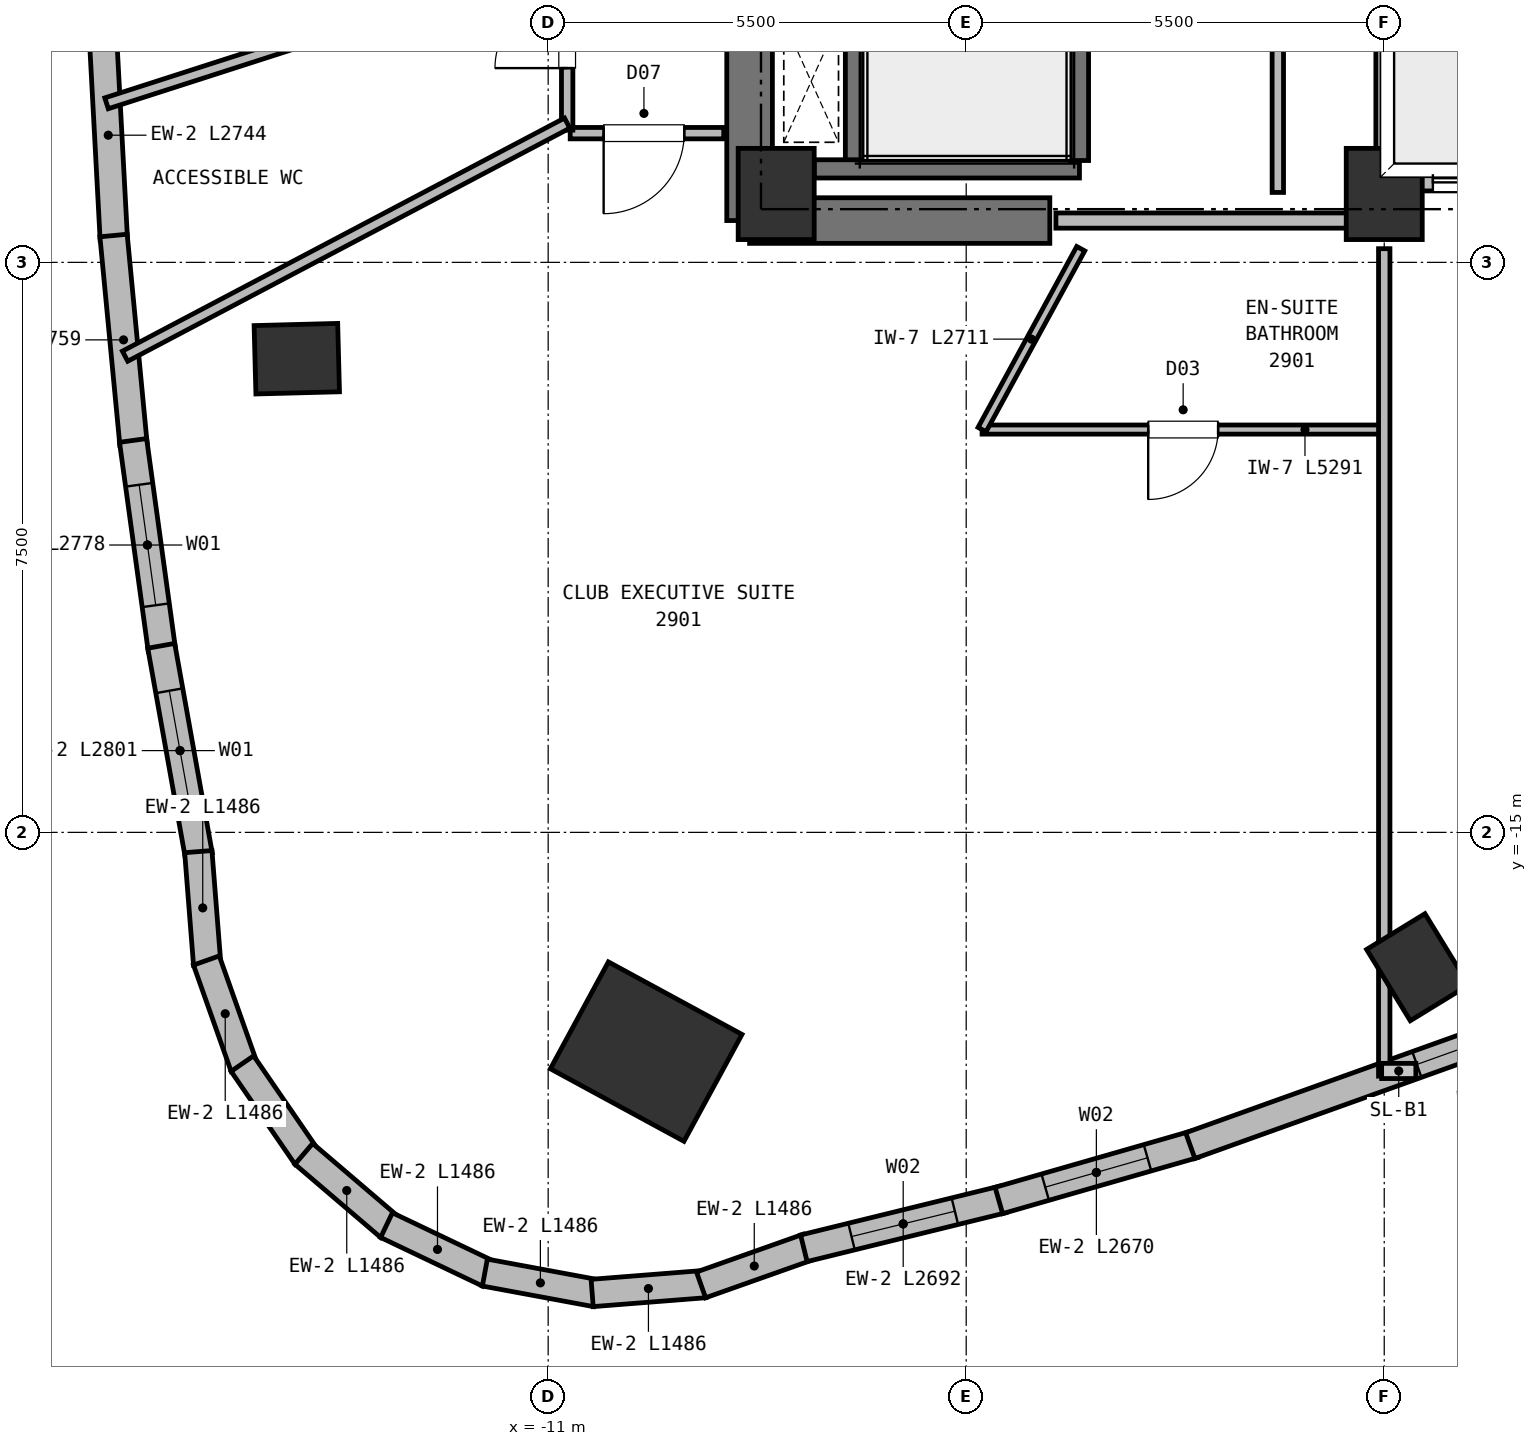
"""IFC4 building model, lengths in metres.
Left out: names, types, materials, properties, quantities, classifications, styles, units other than length and angle.
Written with IfcOpenShell. Run it as: python <this file> out.ifc"""

import sys

from ifc_helpers import new_model, si_unit, direction, frame, frame_2d, origin, origin_2d, place, context, subcontext, project, spatial, rectangle, extrude, element, fill, save


model = new_model("IFC4")
c1 = context("Model", 3, precision=1e-05, world=origin(), true_north=direction((0.0, 1.0)))
c2 = subcontext(c1, "Body", "Model", "MODEL_VIEW")
j1 = project(units=[si_unit("LENGTHUNIT", "METRE"), si_unit("PLANEANGLEUNIT", "RADIAN")], contexts=[c1])
p1 = place(None, origin())
s1 = spatial("IfcSite", under=j1, at=p1, CompositionType="ELEMENT")
p2 = place(p1, origin())
s2 = spatial("IfcBuilding", under=s1, at=p2, CompositionType="ELEMENT")
p3 = place(p2, frame((0.0, 0.0, 108.5)))
s3 = spatial("IfcBuildingStorey", under=s2, at=p3, CompositionType="ELEMENT", Elevation=108.5)
for number, where, z_axis, x_axis in (
    (1, (-8.0, -6.6, 0.0), (0.0, 0.0, 1.0), (1.0, 0.0, 0.0)),
    (2, (0.0, -6.6, 0.0), (0.0, 0.0, 1.0), (1.0, 0.0, 0.0)),
):
    element("IfcColumn", number, at=place(p3, frame(where, z_axis=z_axis, x_axis=x_axis)), inside=s3, PredefinedType="COLUMN", context=c2, shape_type="SweptSolid", body=[
        extrude(rectangle(XDim=1.0, YDim=1.2, at=origin_2d()), origin(), (0.0, 0.0, 1.0), 3.75),
    ])
p4 = place(p3, frame((-8.35, -6.95, 0.0), z_axis=(0.0, 0.0, 1.0), x_axis=(1.0, 0.0, 0.0)))
e3 = element("IfcWall", 3, at=p4, inside=s3, PredefinedType="SHEAR", context=c2, shape_type="SweptSolid", body=[
    extrude(rectangle(XDim=3.95, YDim=0.6, at=frame_2d((1.975, 0.0))), origin(), (0.0, 0.0, 1.0), 3.5),
])
p5 = place(p3, frame((-8.35, -6.95, 0.0), z_axis=(0.0, 0.0, 1.0), x_axis=(0.0, 1.0, 0.0)))
e4 = element("IfcWall", 4, at=p5, inside=s3, PredefinedType="SHEAR", context=c2, shape_type="SweptSolid", body=[
    extrude(rectangle(XDim=8.1, YDim=0.6, at=frame_2d((4.05, 0.0))), origin(), (0.0, 0.0, 1.0), 3.5),
])
p6 = place(p3, frame((-14.307, -8.768, 0.0), z_axis=(0.0, 0.0, 1.0), x_axis=(-0.026176948308, 0.999657324976, 0.0)))
e5 = element("IfcColumn", 5, at=p6, inside=s3, PredefinedType="COLUMN", context=c2, shape_type="SweptSolid", body=[
    extrude(rectangle(XDim=0.9, YDim=1.1, at=origin_2d()), origin(), (0.0, 0.0, 1.0), 3.75),
])
p7 = place(p3, frame((-9.71, -17.885, 0.0), z_axis=(0.0, 0.0, 1.0), x_axis=(0.47715876026, 0.878817112662, 0.0)))
e6 = element("IfcColumn", 6, at=p7, inside=s3, PredefinedType="COLUMN", context=c2, shape_type="SweptSolid", body=[
    extrude(rectangle(XDim=1.6, YDim=2.0, at=origin_2d()), origin(), (0.0, 0.0, 1.0), 3.75),
])
p8 = place(p3, frame((0.439, -16.774, 0.0), z_axis=(0.0, 0.0, 1.0), x_axis=(0.852640164354, 0.522498564716, 0.0)))
e7 = element("IfcColumn", 7, at=p8, inside=s3, PredefinedType="COLUMN", context=c2, shape_type="SweptSolid", body=[
    extrude(rectangle(XDim=0.9, YDim=1.1, at=origin_2d()), origin(), (0.0, 0.0, 1.0), 3.75),
])
p9 = place(p3, frame((-16.715, -7.197, 0.0), z_axis=(0.0, 0.0, 1.0), x_axis=(-0.053474125499, 0.998569235407, 0.0)))
e8 = element("IfcWall", 8, at=p9, inside=s3, PredefinedType="SOLIDWALL", context=c2, shape_type="SweptSolid", body=[
    extrude(rectangle(XDim=2.744, YDim=0.36, at=frame_2d((1.372, 0.0))), origin(), (0.0, 0.0, 1.0), 3.5),
])
p10 = place(p3, frame((-16.456, -9.893, 0.0), z_axis=(0.0, 0.0, 1.0), x_axis=(-0.095147411159, 0.99546319377, 0.0)))
e9 = element("IfcWall", 9, at=p10, inside=s3, PredefinedType="SOLIDWALL", context=c2, shape_type="SweptSolid", body=[
    extrude(rectangle(XDim=2.758, YDim=0.36, at=frame_2d((1.379, 0.0))), origin(), (0.0, 0.0, 1.0), 3.5),
])
p11 = place(p3, frame((-16.083, -12.595, 0.0), z_axis=(0.0, 0.0, 1.0), x_axis=(-0.136238828404, 0.99067602254, 0.0)))
e10 = element("IfcWall", 10, at=p11, inside=s3, PredefinedType="SOLIDWALL", context=c2, shape_type="SweptSolid", body=[
    extrude(rectangle(XDim=2.778, YDim=0.36, at=frame_2d((1.389, 0.0))), origin(), (0.0, 0.0, 1.0), 3.5),
])
p12 = place(p11, frame((0.589, 0.0, 0.72)))
e11 = element("IfcOpeningElement", 11, at=p12, cuts=e10, PredefinedType="OPENING", context=c2, shape_type="SweptSolid", body=[
    extrude(rectangle(XDim=1.6, YDim=1.88, at=frame_2d((0.8, 0.94))), frame((0.0, 0.19, 0.0), z_axis=(0.0, -1.0, 0.0), x_axis=(1.0, 0.0, 0.0)), (0.0, 0.0, 1.0), 0.38),
])
p13 = place(p3, frame((-15.597, -15.303, 0.0), z_axis=(0.0, 0.0, 1.0), x_axis=(-0.176399929502, 0.984318578953, 0.0)))
e12 = element("IfcWall", 12, at=p13, inside=s3, PredefinedType="SOLIDWALL", context=c2, shape_type="SweptSolid", body=[
    extrude(rectangle(XDim=2.801, YDim=0.36, at=frame_2d((1.401, 0.0))), origin(), (0.0, 0.0, 1.0), 3.5),
])
p14 = place(p13, frame((0.601, 0.0, 0.72)))
e13 = element("IfcOpeningElement", 13, at=p14, cuts=e12, PredefinedType="OPENING", context=c2, shape_type="SweptSolid", body=[
    extrude(rectangle(XDim=1.6, YDim=1.88, at=frame_2d((0.8, 0.94))), frame((0.0, 0.19, 0.0), z_axis=(0.0, -1.0, 0.0), x_axis=(1.0, 0.0, 0.0)), (0.0, 0.0, 1.0), 0.38),
])
p15 = place(p3, frame((-15.487, -16.734, 0.0), z_axis=(0.0, 0.0, 1.0), x_axis=(-0.078393018091, 0.996922531952, 0.0)))
e14 = element("IfcWall", 14, at=p15, inside=s3, PredefinedType="SOLIDWALL", context=c2, shape_type="SweptSolid", body=[
    extrude(rectangle(XDim=1.486, YDim=0.36, at=frame_2d((0.743, 0.0))), origin(), (0.0, 0.0, 1.0), 3.5),
])
p16 = place(p3, frame((-15.001, -18.087, 0.0), z_axis=(0.0, 0.0, 1.0), x_axis=(-0.333670746008, 0.942689680254, 0.0)))
e15 = element("IfcWall", 15, at=p16, inside=s3, PredefinedType="SOLIDWALL", context=c2, shape_type="SweptSolid", body=[
    extrude(rectangle(XDim=1.486, YDim=0.36, at=frame_2d((0.743, 0.0))), origin(), (0.0, 0.0, 1.0), 3.5),
])
p17 = place(p3, frame((-14.182, -19.267, 0.0), z_axis=(0.0, 0.0, 1.0), x_axis=(-0.566438155808, 0.824104250472, 0.0)))
e16 = element("IfcWall", 16, at=p17, inside=s3, PredefinedType="SOLIDWALL", context=c2, shape_type="SweptSolid", body=[
    extrude(rectangle(XDim=1.486, YDim=0.36, at=frame_2d((0.743, 0.0))), origin(), (0.0, 0.0, 1.0), 3.5),
])
for number, where, z_axis, x_axis in (
    (17, (-13.085, -20.195, 0.0), (0.0, 0.0, 1.0), (-0.76, 0.649, 0.0)),
    (18, (-11.786, -20.808, 0.0), (0.0, 0.0, 1.0), (-0.903, 0.431, 0.0)),
):
    element("IfcWall", number, at=place(p3, frame(where, z_axis=z_axis, x_axis=x_axis)), inside=s3, PredefinedType="SOLIDWALL", context=c2, shape_type="SweptSolid", body=[
        extrude(rectangle(XDim=1.486, YDim=0.36, at=frame_2d((0.743, 0.0))), origin(), (0.0, 0.0, 1.0), 3.5),
    ])
p18 = place(p3, frame((-10.372, -21.063, 0.0), z_axis=(0.0, 0.0, 1.0), x_axis=(-0.983262389335, 0.182195152844, 0.0)))
e19 = element("IfcWall", 19, at=p18, inside=s3, PredefinedType="SOLIDWALL", context=c2, shape_type="SweptSolid", body=[
    extrude(rectangle(XDim=1.486, YDim=0.36, at=frame_2d((0.743, 0.0))), origin(), (0.0, 0.0, 1.0), 3.5),
])
for number, where, z_axis, x_axis in (
    (20, (-8.94, -20.944, 0.0), (0.0, 0.0, 1.0), (-0.997, -0.079, 0.0)),
    (21, (-7.588, -20.458, 0.0), (0.0, 0.0, 1.0), (-0.943, -0.334, 0.0)),
):
    element("IfcWall", number, at=place(p3, frame(where, z_axis=z_axis, x_axis=x_axis)), inside=s3, PredefinedType="SOLIDWALL", context=c2, shape_type="SweptSolid", body=[
        extrude(rectangle(XDim=1.486, YDim=0.36, at=frame_2d((0.743, 0.0))), origin(), (0.0, 0.0, 1.0), 3.5),
    ])
p19 = place(p3, frame((-5.022, -19.831, 0.0), z_axis=(0.0, 0.0, 1.0), x_axis=(-0.971174008504, -0.23837165353, 0.0)))
e22 = element("IfcWall", 22, at=p19, inside=s3, PredefinedType="SOLIDWALL", context=c2, shape_type="SweptSolid", body=[
    extrude(rectangle(XDim=2.692, YDim=0.36, at=frame_2d((1.346, 0.0))), origin(), (0.0, 0.0, 1.0), 3.5),
])
p20 = place(p19, frame((0.646, 0.0, 0.72)))
e23 = element("IfcOpeningElement", 23, at=p20, cuts=e22, PredefinedType="OPENING", context=c2, shape_type="SweptSolid", body=[
    extrude(rectangle(XDim=1.4, YDim=1.84, at=frame_2d((0.7, 0.92))), frame((0.0, 0.19, 0.0), z_axis=(0.0, -1.0, 0.0), x_axis=(1.0, 0.0, 0.0)), (0.0, 0.0, 1.0), 0.38),
])
p21 = place(p3, frame((-2.504, -19.106, 0.0), z_axis=(0.0, 0.0, 1.0), x_axis=(-0.961133025001, -0.276085690055, 0.0)))
e24 = element("IfcWall", 24, at=p21, inside=s3, PredefinedType="SOLIDWALL", context=c2, shape_type="SweptSolid", body=[
    extrude(rectangle(XDim=2.67, YDim=0.36, at=frame_2d((1.335, 0.0))), origin(), (0.0, 0.0, 1.0), 3.5),
])
p22 = place(p21, frame((0.635, 0.0, 0.72)))
e25 = element("IfcOpeningElement", 25, at=p22, cuts=e24, PredefinedType="OPENING", context=c2, shape_type="SweptSolid", body=[
    extrude(rectangle(XDim=1.4, YDim=1.84, at=frame_2d((0.7, 0.92))), frame((0.0, 0.19, 0.0), z_axis=(0.0, -1.0, 0.0), x_axis=(1.0, 0.0, 0.0)), (0.0, 0.0, 1.0), 0.38),
])
p23 = place(p3, frame((2.934, -17.157, 0.0), z_axis=(0.0, 0.0, 1.0), x_axis=(-0.941431533916, -0.337204191773, 0.0)))
e26 = element("IfcWall", 26, at=p23, inside=s3, PredefinedType="SOLIDWALL", context=c2, shape_type="SweptSolid", body=[
    extrude(rectangle(XDim=5.827, YDim=0.36, at=frame_2d((2.914, 0.0))), origin(), (0.0, 0.0, 1.0), 3.5),
])
p24 = place(p23, frame((1.06, 0.0, 0.72)))
e27 = element("IfcOpeningElement", 27, at=p24, cuts=e26, PredefinedType="OPENING", context=c2, shape_type="SweptSolid", body=[
    extrude(rectangle(XDim=1.6, YDim=1.88, at=frame_2d((0.8, 0.94))), frame((0.0, 0.19, 0.0), z_axis=(0.0, -1.0, 0.0), x_axis=(1.0, 0.0, 0.0)), (0.0, 0.0, 1.0), 0.38),
])
p25 = place(p3, frame((-6.97, -6.16, 0.0), z_axis=(0.0, 0.0, 1.0), x_axis=(0.0, 1.0, 0.0)))
e28 = element("IfcWall", 28, at=p25, inside=s3, PredefinedType="SHEAR", context=c2, shape_type="SweptSolid", body=[
    extrude(rectangle(XDim=7.22, YDim=0.24, at=frame_2d((3.61, 0.0))), origin(), (0.0, 0.0, 1.0), 3.5),
])
p26 = place(p3, frame((-7.5, -6.27, 0.0), z_axis=(0.0, 0.0, 1.0), x_axis=(1.0, 0.0, 0.0)))
e29 = element("IfcWall", 29, at=p26, inside=s3, PredefinedType="SHEAR", context=c2, shape_type="SweptSolid", body=[
    extrude(rectangle(XDim=3.49, YDim=0.24, at=frame_2d((1.745, 0.0))), origin(), (0.0, 0.0, 1.0), 3.5),
])
p27 = place(p3, frame((-4.01, -6.16, 0.0), z_axis=(0.0, 0.0, 1.0), x_axis=(0.0, 1.0, 0.0)))
e30 = element("IfcWall", 30, at=p27, inside=s3, PredefinedType="SHEAR", context=c2, shape_type="SweptSolid", body=[
    extrude(rectangle(XDim=7.22, YDim=0.24, at=frame_2d((3.61, 0.0))), origin(), (0.0, 0.0, 1.0), 3.5),
])
p28 = place(p3, frame((0.0, -6.45, 0.0), z_axis=(0.0, 0.0, 1.0), x_axis=(1.0, 0.0, 0.0)))
e31 = element("IfcWall", 31, at=p28, inside=s3, PredefinedType="PARTITIONING", context=c2, shape_type="SweptSolid", body=[
    extrude(rectangle(XDim=1.86, YDim=0.22, at=frame_2d((0.93, 0.0))), origin(), (0.0, 0.0, 1.0), 3.12),
])
p29 = place(p28, frame((0.64, 0.0, 0.0)))
e32 = element("IfcOpeningElement", 32, at=p29, cuts=e31, PredefinedType="OPENING", context=c2, shape_type="SweptSolid", body=[
    extrude(rectangle(XDim=1.08, YDim=2.15, at=frame_2d((0.54, 1.075))), frame((0.0, 0.12, 0.0), z_axis=(0.0, -1.0, 0.0), x_axis=(1.0, 0.0, 0.0)), (0.0, 0.0, 1.0), 0.24),
])
p30 = place(p3, frame((0.0, -6.33, 0.0), z_axis=(0.0, 0.0, 1.0), x_axis=(0.0, 1.0, 0.0)))
e33 = element("IfcWall", 33, at=p30, inside=s3, PredefinedType="PARTITIONING", context=c2, shape_type="SweptSolid", body=[
    extrude(rectangle(XDim=1.86, YDim=0.22, at=frame_2d((0.93, 0.0))), origin(), (0.0, 0.0, 1.0), 3.5),
])
p31 = place(p3, frame((-4.32, -6.95, 0.0), z_axis=(0.0, 0.0, 1.0), x_axis=(1.0, 0.0, 0.0)))
e34 = element("IfcWall", 34, at=p31, inside=s3, PredefinedType="PARTITIONING", context=c2, shape_type="SweptSolid", body=[
    extrude(rectangle(XDim=4.32, YDim=0.2, at=frame_2d((2.16, 0.0))), origin(), (0.0, 0.0, 1.0), 3.5),
])
p32 = place(p3, frame((-1.4, -6.58, 0.0), z_axis=(0.0, 0.0, 1.0), x_axis=(0.0, 1.0, 0.0)))
e35 = element("IfcWall", 35, at=p32, inside=s3, PredefinedType="PARTITIONING", context=c2, shape_type="SweptSolid", body=[
    extrude(rectangle(XDim=7.53, YDim=0.15, at=frame_2d((3.765, 0.0))), origin(), (0.0, 0.0, 1.0), 3.5),
])
p33 = place(p3, frame((-8.69, -5.8, 0.0), z_axis=(0.0, 0.0, 1.0), x_axis=(-1.0, 0.0, 0.0)))
e36 = element("IfcWall", 36, at=p33, inside=s3, PredefinedType="PARTITIONING", context=c2, shape_type="SweptSolid", body=[
    extrude(rectangle(XDim=2.02, YDim=0.15, at=frame_2d((1.01, 0.0))), origin(), (0.0, 0.0, 1.0), 3.5),
])
p34 = place(p33, frame((0.52, 0.0, 0.0)))
e37 = element("IfcOpeningElement", 37, at=p34, cuts=e36, PredefinedType="OPENING", context=c2, shape_type="SweptSolid", body=[
    extrude(rectangle(XDim=1.06, YDim=2.15, at=frame_2d((0.53, 1.075))), frame((0.0, 0.085, 0.0), z_axis=(0.0, -1.0, 0.0), x_axis=(1.0, 0.0, 0.0)), (0.0, 0.0, 1.0), 0.17),
])
p35 = place(p3, frame((-10.75, -5.76, 0.0), z_axis=(0.0, 0.0, 1.0), x_axis=(0.0, 1.0, 0.0)))
e38 = element("IfcWall", 38, at=p35, inside=s3, PredefinedType="PARTITIONING", context=c2, shape_type="SweptSolid", body=[
    extrude(rectangle(XDim=12.92, YDim=0.15, at=frame_2d((6.46, 0.0))), origin(), (0.0, 0.0, 1.0), 3.5),
])
p36 = place(p35, frame((2.835, 0.0, 0.0)))
e39 = element("IfcOpeningElement", 39, at=p36, cuts=e38, PredefinedType="OPENING", context=c2, shape_type="SweptSolid", body=[
    extrude(rectangle(XDim=1.0, YDim=2.15, at=frame_2d((0.5, 1.075))), frame((0.0, 0.085, 0.0), z_axis=(0.0, -1.0, 0.0), x_axis=(1.0, 0.0, 0.0)), (0.0, 0.0, 1.0), 0.17),
])
p37 = place(p35, frame((0.816, 0.0, 0.0)))
e40 = element("IfcOpeningElement", 40, at=p37, cuts=e38, PredefinedType="OPENING", context=c2, shape_type="SweptSolid", body=[
    extrude(rectangle(XDim=0.95, YDim=2.1, at=frame_2d((0.475, 1.05))), frame((0.0, 0.085, 0.0), z_axis=(0.0, -1.0, 0.0), x_axis=(1.0, 0.0, 0.0)), (0.0, 0.0, 1.0), 0.17),
])
p38 = place(p35, frame((9.847, 0.0, 0.0)))
e41 = element("IfcOpeningElement", 41, at=p38, cuts=e38, PredefinedType="OPENING", context=c2, shape_type="SweptSolid", body=[
    extrude(rectangle(XDim=1.0, YDim=2.15, at=frame_2d((0.5, 1.075))), frame((0.0, 0.085, 0.0), z_axis=(0.0, -1.0, 0.0), x_axis=(1.0, 0.0, 0.0)), (0.0, 0.0, 1.0), 0.17),
])
p39 = place(p35, frame((6.267, 0.0, 0.0)))
e42 = element("IfcOpeningElement", 42, at=p39, cuts=e38, PredefinedType="OPENING", context=c2, shape_type="SweptSolid", body=[
    extrude(rectangle(XDim=1.0, YDim=2.15, at=frame_2d((0.5, 1.075))), frame((0.0, 0.085, 0.0), z_axis=(0.0, -1.0, 0.0), x_axis=(1.0, 0.0, 0.0)), (0.0, 0.0, 1.0), 0.17),
])
p40 = place(p3, frame((-10.75, -5.668, 0.0), z_axis=(0.0, 0.0, 1.0), x_axis=(-0.88456520122, -0.466416557158, 0.0)))
e43 = element("IfcWall", 43, at=p40, inside=s3, PredefinedType="PARTITIONING", context=c2, shape_type="SweptSolid", body=[
    extrude(rectangle(XDim=6.575, YDim=0.15, at=frame_2d((3.288, 0.0))), origin(), (0.0, 0.0, 1.0), 3.5),
])
p41 = place(p3, frame((0.0, -9.7, 0.0), z_axis=(0.0, 0.0, 1.0), x_axis=(-1.0, 0.0, 0.0)))
e44 = element("IfcWall", 44, at=p41, inside=s3, PredefinedType="PARTITIONING", context=c2, shape_type="SweptSolid", body=[
    extrude(rectangle(XDim=5.291, YDim=0.12, at=frame_2d((2.646, 0.0))), origin(), (0.0, 0.0, 1.0), 3.5),
])
p42 = place(p41, frame((2.186, 0.0, 0.0)))
e45 = element("IfcOpeningElement", 45, at=p42, cuts=e44, PredefinedType="OPENING", context=c2, shape_type="SweptSolid", body=[
    extrude(rectangle(XDim=0.92, YDim=2.1, at=frame_2d((0.46, 1.05))), frame((0.0, 0.07, 0.0), z_axis=(0.0, -1.0, 0.0), x_axis=(1.0, 0.0, 0.0)), (0.0, 0.0, 1.0), 0.14),
])
p43 = place(p3, frame((-5.291, -9.7, 0.0), z_axis=(0.0, 0.0, 1.0), x_axis=(0.478915225664, 0.877861154527, 0.0)))
e46 = element("IfcWall", 46, at=p43, inside=s3, PredefinedType="PARTITIONING", context=c2, shape_type="SweptSolid", body=[
    extrude(rectangle(XDim=2.711, YDim=0.12, at=frame_2d((1.355, 0.0))), origin(), (0.0, 0.0, 1.0), 3.5),
])
p44 = place(p3, frame((0.0, -7.32, 0.0), z_axis=(0.0, 0.0, 1.0), x_axis=(0.0, -1.0, 0.0)))
e47 = element("IfcWall", 47, at=p44, inside=s3, PredefinedType="PARTITIONING", context=c2, shape_type="SweptSolid", body=[
    extrude(rectangle(XDim=10.888, YDim=0.15, at=frame_2d((5.444, 0.0))), origin(), (0.0, 0.0, 1.0), 3.5),
])
p45 = place(p3, frame((-10.75, -3.458, 0.0), z_axis=(0.0, 0.0, 1.0), x_axis=(-0.951970686229, -0.306189177732, 0.0)))
e48 = element("IfcWall", 48, at=p45, inside=s3, PredefinedType="PARTITIONING", context=c2, shape_type="SweptSolid", body=[
    extrude(rectangle(XDim=6.366, YDim=0.15, at=frame_2d((3.183, 0.0))), origin(), (0.0, 0.0, 1.0), 3.5),
])
p46 = place(p12, origin())
e49 = element("IfcWindow", 49, at=p46, inside=s3, PartitioningType="SINGLE_PANEL", PredefinedType="WINDOW", context=c2, shape_type="SweptSolid", body=[
    extrude(rectangle(XDim=1.6, YDim=1.88, at=frame_2d((0.8, 0.94))), frame((0.0, 0.03, 0.0), z_axis=(0.0, -1.0, 0.0), x_axis=(1.0, 0.0, 0.0)), (0.0, 0.0, 1.0), 0.06),
])
fill(e11, e49)
p47 = place(p14, origin())
e50 = element("IfcWindow", 50, at=p47, inside=s3, PartitioningType="SINGLE_PANEL", PredefinedType="WINDOW", context=c2, shape_type="SweptSolid", body=[
    extrude(rectangle(XDim=1.6, YDim=1.88, at=frame_2d((0.8, 0.94))), frame((0.0, 0.03, 0.0), z_axis=(0.0, -1.0, 0.0), x_axis=(1.0, 0.0, 0.0)), (0.0, 0.0, 1.0), 0.06),
])
fill(e13, e50)
p48 = place(p20, origin())
e51 = element("IfcWindow", 51, at=p48, inside=s3, PartitioningType="SINGLE_PANEL", PredefinedType="WINDOW", context=c2, shape_type="SweptSolid", body=[
    extrude(rectangle(XDim=1.4, YDim=1.84, at=frame_2d((0.7, 0.92))), frame((0.0, 0.03, 0.0), z_axis=(0.0, -1.0, 0.0), x_axis=(1.0, 0.0, 0.0)), (0.0, 0.0, 1.0), 0.06),
])
fill(e23, e51)
p49 = place(p22, origin())
e52 = element("IfcWindow", 52, at=p49, inside=s3, PartitioningType="SINGLE_PANEL", PredefinedType="WINDOW", context=c2, shape_type="SweptSolid", body=[
    extrude(rectangle(XDim=1.4, YDim=1.84, at=frame_2d((0.7, 0.92))), frame((0.0, 0.03, 0.0), z_axis=(0.0, -1.0, 0.0), x_axis=(1.0, 0.0, 0.0)), (0.0, 0.0, 1.0), 0.06),
])
fill(e25, e52)
p50 = place(p24, origin())
e53 = element("IfcWindow", 53, at=p50, inside=s3, PartitioningType="SINGLE_PANEL", PredefinedType="WINDOW", context=c2, shape_type="SweptSolid", body=[
    extrude(rectangle(XDim=1.6, YDim=1.88, at=frame_2d((0.8, 0.94))), frame((0.0, 0.03, 0.0), z_axis=(0.0, -1.0, 0.0), x_axis=(1.0, 0.0, 0.0)), (0.0, 0.0, 1.0), 0.06),
])
fill(e27, e53)
p51 = place(p29, origin())
e54 = element("IfcDoor", 54, at=p51, inside=s3, OperationType="DOUBLE_DOOR_SLIDING", PredefinedType="DOOR", context=c2, shape_type="SweptSolid", body=[
    extrude(rectangle(XDim=1.08, YDim=2.15, at=frame_2d((0.54, 1.075))), frame((0.0, 0.025, 0.0), z_axis=(0.0, -1.0, 0.0), x_axis=(1.0, 0.0, 0.0)), (0.0, 0.0, 1.0), 0.05),
])
fill(e32, e54)
p52 = place(p42, origin())
e55 = element("IfcDoor", 55, at=p52, inside=s3, OperationType="SINGLE_SWING_RIGHT", PredefinedType="DOOR", context=c2, shape_type="SweptSolid", body=[
    extrude(rectangle(XDim=0.92, YDim=2.1, at=frame_2d((0.46, 1.05))), frame((0.0, 0.025, 0.0), z_axis=(0.0, -1.0, 0.0), x_axis=(1.0, 0.0, 0.0)), (0.0, 0.0, 1.0), 0.05),
])
fill(e45, e55)
p53 = place(p37, origin())
e56 = element("IfcDoor", 56, at=p53, inside=s3, OperationType="SINGLE_SWING_LEFT", PredefinedType="DOOR", context=c2, shape_type="SweptSolid", body=[
    extrude(rectangle(XDim=0.95, YDim=2.1, at=frame_2d((0.475, 1.05))), frame((0.0, 0.025, 0.0), z_axis=(0.0, -1.0, 0.0), x_axis=(1.0, 0.0, 0.0)), (0.0, 0.0, 1.0), 0.05),
])
fill(e40, e56)
p54 = place(p34, origin())
e57 = element("IfcDoor", 57, at=p54, inside=s3, OperationType="SINGLE_SWING_RIGHT", PredefinedType="DOOR", context=c2, shape_type="SweptSolid", body=[
    extrude(rectangle(XDim=1.06, YDim=2.15, at=frame_2d((0.53, 1.075))), frame((0.0, 0.025, 0.0), z_axis=(0.0, -1.0, 0.0), x_axis=(1.0, 0.0, 0.0)), (0.0, 0.0, 1.0), 0.05),
])
fill(e37, e57)
save(model, sys.argv[1])
